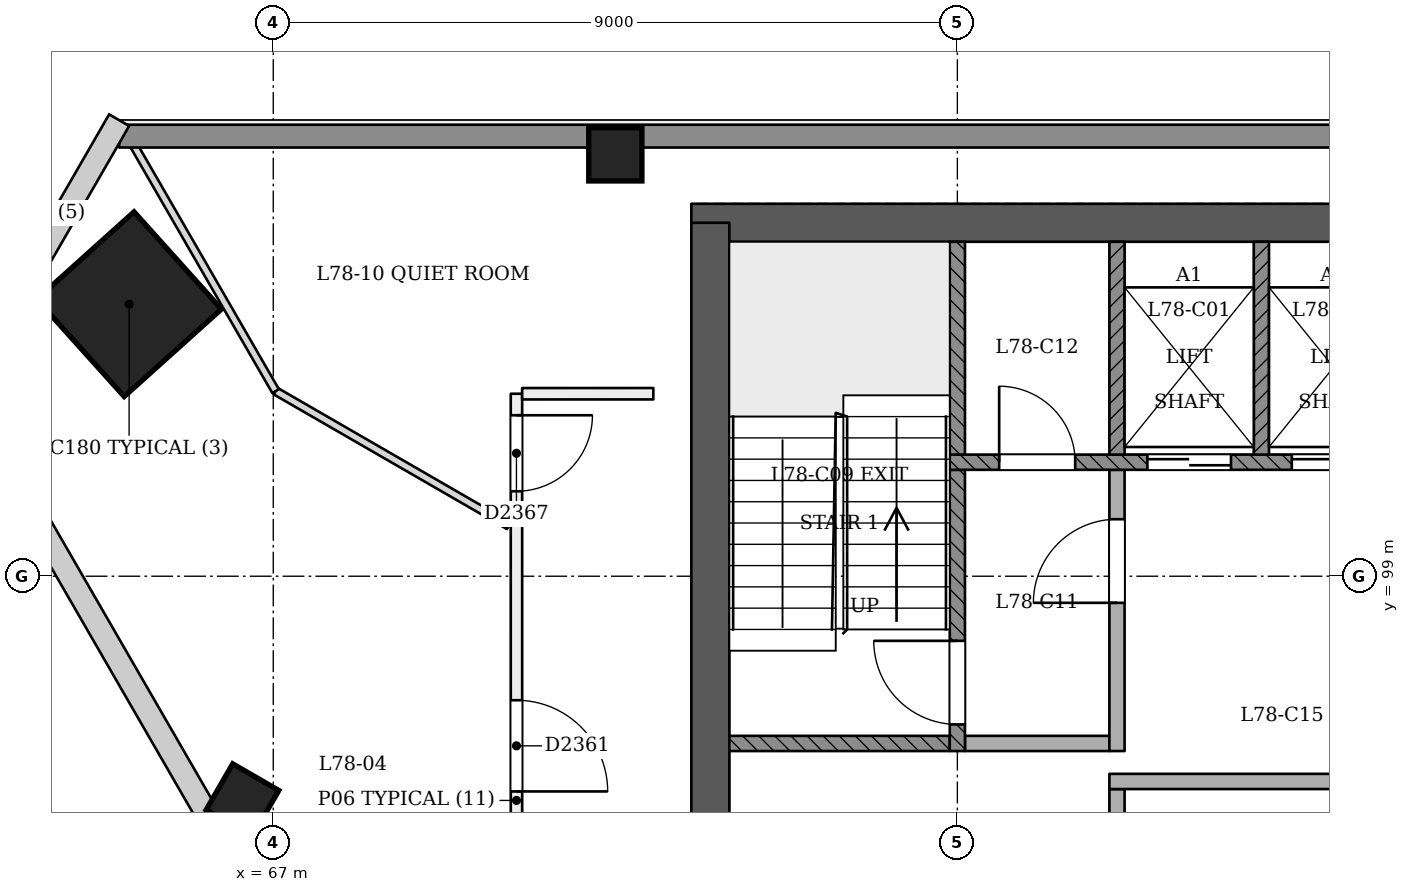
"""IFC4 building model, lengths in metres.
Left out: names, types, materials, properties, quantities, classifications, styles, units other than length and angle.
Written with IfcOpenShell. Run it as: python <this file> out.ifc"""

import sys

from ifc_helpers import new_model, si_unit, direction, frame, frame_2d, origin, origin_2d, place, context, subcontext, project, spatial, rectangle, extrude, element, fill, save


model = new_model("IFC4")
c1 = context("Model", 3, precision=1e-05, world=origin(), true_north=direction((0.0, 1.0)))
c2 = subcontext(c1, "Body", "Model", "MODEL_VIEW")
j1 = project(units=[si_unit("LENGTHUNIT", "METRE"), si_unit("PLANEANGLEUNIT", "RADIAN")], contexts=[c1])
p1 = place(None, origin())
s1 = spatial("IfcSite", under=j1, at=p1, CompositionType="ELEMENT")
p2 = place(p1, origin())
s2 = spatial("IfcBuilding", under=s1, at=p2, CompositionType="ELEMENT")
p3 = place(p2, frame((0.0, 0.0, 302.2)))
s3 = spatial("IfcBuildingStorey", under=s2, at=p3, CompositionType="ELEMENT", Elevation=302.2)
p4 = place(p3, frame((97.25, 103.65, 0.0), z_axis=(0.0, 0.0, 1.0), x_axis=(-1.0, 0.0, 0.0)))
e1 = element("IfcWall", 1, at=p4, inside=s3, PredefinedType="SHEAR", context=c2, shape_type="SweptSolid", body=[
    extrude(rectangle(XDim=24.75, YDim=0.5, at=frame_2d((12.375, 0.0))), origin(), (0.0, 0.0, 1.0), 3.6),
])
p5 = place(p3, frame((72.75, 103.65, 0.0), z_axis=(0.0, 0.0, 1.0), x_axis=(0.0, -1.0, 0.0)))
e2 = element("IfcWall", 2, at=p5, inside=s3, PredefinedType="SHEAR", context=c2, shape_type="SweptSolid", body=[
    extrude(rectangle(XDim=10.75, YDim=0.5, at=frame_2d((5.375, 0.0))), origin(), (0.0, 0.0, 1.0), 3.6),
])
p6 = place(p3, frame((65.069, 102.568, 0.0), z_axis=(0.028401796786, 0.009286506348, 0.999553449666), x_axis=(-0.866200496686, 0.499297251293, 0.019973842716)))
e3 = element("IfcColumn", 3, at=p6, inside=s3, PredefinedType="COLUMN", context=c2, shape_type="SweptSolid", body=[
    extrude(rectangle(XDim=1.72, YDim=1.72, at=origin_2d()), origin(), (0.0, 0.0, 1.0), 3.602),
])
p7 = place(p3, frame((71.5, 104.55, 0.0), z_axis=(0.0, 0.0, 1.0), x_axis=(1.0, 0.0, 0.0)))
e4 = element("IfcColumn", 4, at=p7, inside=s3, PredefinedType="COLUMN", context=c2, shape_type="SweptSolid", body=[
    extrude(rectangle(XDim=0.7, YDim=0.7, at=origin_2d()), origin(), (0.0, 0.0, 1.0), 3.6),
])
p8 = place(p3, frame((66.567, 96.007, -0.021), z_axis=(0.02222134892, 0.038480872521, 0.999012229206), x_axis=(-0.865642107509, -0.499182153693, 0.038482712231)))
e5 = element("IfcColumn", 5, at=p8, inside=s3, PredefinedType="COLUMN", context=c2, shape_type="SweptSolid", body=[
    extrude(rectangle(XDim=0.7, YDim=0.7, at=origin_2d()), origin(), (0.0, 0.0, 1.0), 3.604),
])
p9 = place(p3, frame((70.199, 101.401, 0.0), z_axis=(0.0, 0.0, 1.0), x_axis=(6.844627e-05, -0.999999997658, 0.0)))
e6 = element("IfcWall", 6, at=p9, inside=s3, PredefinedType="PARTITIONING", context=c2, shape_type="SweptSolid", body=[
    extrude(rectangle(XDim=10.701, YDim=0.15, at=frame_2d((5.35, 0.0))), origin(), (0.0, 0.0, 1.0), 3.2),
])
p10 = place(p9, frame((4.032, 0.0, 0.0)))
e7 = element("IfcOpeningElement", 7, at=p10, cuts=e6, PredefinedType="OPENING", context=c2, shape_type="SweptSolid", body=[
    extrude(rectangle(XDim=1.2, YDim=2.1, at=frame_2d((0.6, 1.05))), frame((0.0, 0.085, 0.0), z_axis=(0.0, -1.0, 0.0), x_axis=(1.0, 0.0, 0.0)), (0.0, 0.0, 1.0), 0.171),
])
p11 = place(p9, frame((0.283, 0.0, 0.0)))
e8 = element("IfcOpeningElement", 8, at=p11, cuts=e6, PredefinedType="OPENING", context=c2, shape_type="SweptSolid", body=[
    extrude(rectangle(XDim=1.0, YDim=2.1, at=frame_2d((0.5, 1.05))), frame((0.0, 0.085, 0.0), z_axis=(0.0, -1.0, 0.0), x_axis=(1.0, 0.0, 0.0)), (0.0, 0.0, 1.0), 0.171),
])
p12 = place(p3, frame((72.0, 101.401, 0.0), z_axis=(0.0, 0.0, 1.0), x_axis=(-0.999999989991, -0.000141482738, 0.0)))
e9 = element("IfcWall", 9, at=p12, inside=s3, PredefinedType="PARTITIONING", context=c2, shape_type="SweptSolid", body=[
    extrude(rectangle(XDim=1.726, YDim=0.15, at=frame_2d((0.863, 0.0))), origin(), (0.0, 0.0, 1.0), 3.2),
])
p13 = place(p3, frame((70.099, 99.664, 0.0), z_axis=(0.0, 0.0, 1.0), x_axis=(-0.866034141321, 0.499984865837, 0.0)))
e10 = element("IfcWall", 10, at=p13, inside=s3, PredefinedType="PARTITIONING", context=c2, shape_type="SweptSolid", body=[
    extrude(rectangle(XDim=3.543, YDim=0.1, at=frame_2d((1.772, 0.0))), origin(), (0.0, 0.0, 1.0), 3.2),
])
p14 = place(p3, frame((67.031, 101.435, 0.0), z_axis=(0.0, 0.0, 1.0), x_axis=(-0.499991868013, 0.866030098739, 0.0)))
e11 = element("IfcWall", 11, at=p14, inside=s3, PredefinedType="PARTITIONING", context=c2, shape_type="SweptSolid", body=[
    extrude(rectangle(XDim=4.0, YDim=0.1, at=frame_2d((2.0, 0.0))), origin(), (0.0, 0.0, 1.0), 2.7),
])
p15 = place(p3, frame((64.972, 104.79, 0.0), z_axis=(0.0, 0.0, 1.0), x_axis=(1.0, 0.0, 0.0)))
e12 = element("IfcWall", 12, at=p15, inside=s3, PredefinedType="SOLIDWALL", context=c2, shape_type="SweptSolid", body=[
    extrude(rectangle(XDim=40.055, YDim=0.3, at=frame_2d((20.028, 0.0))), origin(), (0.0, 0.0, 1.0), 2.7),
])
p16 = place(p3, frame((78.1, 93.4, 0.0), z_axis=(0.0, 0.0, 1.0), x_axis=(0.0, 1.0, 0.0)))
e13 = element("IfcWall", 13, at=p16, inside=s3, PredefinedType="PARTITIONING", context=c2, shape_type="SweptSolid", body=[
    extrude(rectangle(XDim=2.8, YDim=0.2, at=frame_2d((1.4, 0.0))), origin(), (0.0, 0.0, 1.0), 3.2),
])
p17 = place(p3, frame((78.0, 96.3, 0.0), z_axis=(0.0, 0.0, 1.0), x_axis=(1.0, 0.0, 0.0)))
e14 = element("IfcWall", 14, at=p17, inside=s3, PredefinedType="PARTITIONING", context=c2, shape_type="SweptSolid", body=[
    extrude(rectangle(XDim=7.8, YDim=0.2, at=frame_2d((3.9, 0.0))), origin(), (0.0, 0.0, 1.0), 3.2),
])
p18 = place(p17, frame((3.4, 0.0, 0.0)))
e15 = element("IfcOpeningElement", 15, at=p18, cuts=e14, PredefinedType="OPENING", context=c2, shape_type="SweptSolid", body=[
    extrude(rectangle(XDim=1.0, YDim=2.1, at=frame_2d((0.5, 1.05))), frame((0.0, 0.11, 0.0), z_axis=(0.0, -1.0, 0.0), x_axis=(1.0, 0.0, 0.0)), (0.0, 0.0, 1.0), 0.221),
])
p19 = place(p3, frame((73.0, 96.8, 0.0), z_axis=(0.0, 0.0, 1.0), x_axis=(1.0, 0.0, 0.0)))
e16 = element("IfcWall", 16, at=p19, inside=s3, PredefinedType="SOLIDWALL", context=c2, shape_type="SweptSolid", body=[
    extrude(rectangle(XDim=2.9, YDim=0.2, at=frame_2d((1.45, 0.0))), origin(), (0.0, 0.0, 1.0), 3.2),
])
p20 = place(p3, frame((76.0, 96.7, 0.0), z_axis=(0.0, 0.0, 1.0), x_axis=(0.0, 1.0, 0.0)))
e17 = element("IfcWall", 17, at=p20, inside=s3, PredefinedType="SOLIDWALL", context=c2, shape_type="SweptSolid", body=[
    extrude(rectangle(XDim=3.7, YDim=0.2, at=frame_2d((1.85, 0.0))), origin(), (0.0, 0.0, 1.0), 3.2),
])
p21 = place(p20, frame((0.35, 0.0, 0.0)))
e18 = element("IfcOpeningElement", 18, at=p21, cuts=e17, PredefinedType="OPENING", context=c2, shape_type="SweptSolid", body=[
    extrude(rectangle(XDim=1.1, YDim=2.1, at=frame_2d((0.55, 1.05))), frame((0.0, 0.11, 0.0), z_axis=(0.0, -1.0, 0.0), x_axis=(1.0, 0.0, 0.0)), (0.0, 0.0, 1.0), 0.221),
])
p22 = place(p3, frame((76.1, 96.8, 0.0), z_axis=(0.0, 0.0, 1.0), x_axis=(1.0, 0.0, 0.0)))
e19 = element("IfcWall", 19, at=p22, inside=s3, PredefinedType="PARTITIONING", context=c2, shape_type="SweptSolid", body=[
    extrude(rectangle(XDim=1.9, YDim=0.2, at=frame_2d((0.95, 0.0))), origin(), (0.0, 0.0, 1.0), 3.2),
])
p23 = place(p3, frame((78.1, 96.7, 0.0), z_axis=(0.0, 0.0, 1.0), x_axis=(0.0, 1.0, 0.0)))
e20 = element("IfcWall", 20, at=p23, inside=s3, PredefinedType="PARTITIONING", context=c2, shape_type="SweptSolid", body=[
    extrude(rectangle(XDim=3.7, YDim=0.2, at=frame_2d((1.85, 0.0))), origin(), (0.0, 0.0, 1.0), 3.2),
])
p24 = place(p23, frame((1.95, 0.0, 0.0)))
e21 = element("IfcOpeningElement", 21, at=p24, cuts=e20, PredefinedType="OPENING", context=c2, shape_type="SweptSolid", body=[
    extrude(rectangle(XDim=1.1, YDim=2.1, at=frame_2d((0.55, 1.05))), frame((0.0, 0.11, 0.0), z_axis=(0.0, -1.0, 0.0), x_axis=(1.0, 0.0, 0.0)), (0.0, 0.0, 1.0), 0.221),
])
p25 = place(p3, frame((75.9, 100.5, 0.0), z_axis=(0.0, 0.0, 1.0), x_axis=(1.0, 0.0, 0.0)))
e22 = element("IfcWall", 22, at=p25, inside=s3, PredefinedType="SOLIDWALL", context=c2, shape_type="SweptSolid", body=[
    extrude(rectangle(XDim=18.2, YDim=0.2, at=frame_2d((9.1, 0.0))), origin(), (0.0, 0.0, 1.0), 3.2),
])
p26 = place(p25, frame((2.6, 0.0, 0.0)))
e23 = element("IfcOpeningElement", 23, at=p26, cuts=e22, PredefinedType="OPENING", context=c2, shape_type="SweptSolid", body=[
    extrude(rectangle(XDim=1.1, YDim=2.1, at=frame_2d((0.55, 1.05))), frame((0.0, 0.11, 0.0), z_axis=(0.0, -1.0, 0.0), x_axis=(1.0, 0.0, 0.0)), (0.0, 0.0, 1.0), 0.221),
])
p27 = place(p25, frame((4.5, 0.0, 0.0)))
e24 = element("IfcOpeningElement", 24, at=p27, cuts=e22, PredefinedType="OPENING", context=c2, shape_type="SweptSolid", body=[
    extrude(rectangle(XDim=1.1, YDim=2.1, at=frame_2d((0.55, 1.05))), frame((0.0, 0.11, 0.0), z_axis=(0.0, -1.0, 0.0), x_axis=(1.0, 0.0, 0.0)), (0.0, 0.0, 1.0), 0.221),
])
p28 = place(p25, frame((6.4, 0.0, 0.0)))
e25 = element("IfcOpeningElement", 25, at=p28, cuts=e22, PredefinedType="OPENING", context=c2, shape_type="SweptSolid", body=[
    extrude(rectangle(XDim=1.1, YDim=2.1, at=frame_2d((0.55, 1.05))), frame((0.0, 0.11, 0.0), z_axis=(0.0, -1.0, 0.0), x_axis=(1.0, 0.0, 0.0)), (0.0, 0.0, 1.0), 0.221),
])
p29 = place(p25, frame((8.3, 0.0, 0.0)))
e26 = element("IfcOpeningElement", 26, at=p29, cuts=e22, PredefinedType="OPENING", context=c2, shape_type="SweptSolid", body=[
    extrude(rectangle(XDim=1.1, YDim=2.1, at=frame_2d((0.55, 1.05))), frame((0.0, 0.11, 0.0), z_axis=(0.0, -1.0, 0.0), x_axis=(1.0, 0.0, 0.0)), (0.0, 0.0, 1.0), 0.221),
])
p30 = place(p25, frame((10.2, 0.0, 0.0)))
e27 = element("IfcOpeningElement", 27, at=p30, cuts=e22, PredefinedType="OPENING", context=c2, shape_type="SweptSolid", body=[
    extrude(rectangle(XDim=1.1, YDim=2.1, at=frame_2d((0.55, 1.05))), frame((0.0, 0.11, 0.0), z_axis=(0.0, -1.0, 0.0), x_axis=(1.0, 0.0, 0.0)), (0.0, 0.0, 1.0), 0.221),
])
p31 = place(p25, frame((12.1, 0.0, 0.0)))
e28 = element("IfcOpeningElement", 28, at=p31, cuts=e22, PredefinedType="OPENING", context=c2, shape_type="SweptSolid", body=[
    extrude(rectangle(XDim=1.1, YDim=2.1, at=frame_2d((0.55, 1.05))), frame((0.0, 0.11, 0.0), z_axis=(0.0, -1.0, 0.0), x_axis=(1.0, 0.0, 0.0)), (0.0, 0.0, 1.0), 0.221),
])
p32 = place(p25, frame((14.0, 0.0, 0.0)))
e29 = element("IfcOpeningElement", 29, at=p32, cuts=e22, PredefinedType="OPENING", context=c2, shape_type="SweptSolid", body=[
    extrude(rectangle(XDim=1.1, YDim=2.1, at=frame_2d((0.55, 1.05))), frame((0.0, 0.11, 0.0), z_axis=(0.0, -1.0, 0.0), x_axis=(1.0, 0.0, 0.0)), (0.0, 0.0, 1.0), 0.221),
])
p33 = place(p25, frame((0.65, 0.0, 0.0)))
e30 = element("IfcOpeningElement", 30, at=p33, cuts=e22, PredefinedType="OPENING", context=c2, shape_type="SweptSolid", body=[
    extrude(rectangle(XDim=1.0, YDim=2.1, at=frame_2d((0.5, 1.05))), frame((0.0, 0.11, 0.0), z_axis=(0.0, -1.0, 0.0), x_axis=(1.0, 0.0, 0.0)), (0.0, 0.0, 1.0), 0.221),
])
p34 = place(p25, frame((16.3, 0.0, 0.0)))
e31 = element("IfcOpeningElement", 31, at=p34, cuts=e22, PredefinedType="OPENING", context=c2, shape_type="SweptSolid", body=[
    extrude(rectangle(XDim=1.0, YDim=2.1, at=frame_2d((0.5, 1.05))), frame((0.0, 0.11, 0.0), z_axis=(0.0, -1.0, 0.0), x_axis=(1.0, 0.0, 0.0)), (0.0, 0.0, 1.0), 0.221),
])
for number, where, z_axis, x_axis in (
    (32, (76.0, 100.6, 0.0), (0.0, 0.0, 1.0), (0.0, 1.0, 0.0)),
    (33, (78.1, 100.6, 0.0), (0.0, 0.0, 1.0), (0.0, 1.0, 0.0)),
    (34, (80.0, 100.6, 0.0), (0.0, 0.0, 1.0), (0.0, 1.0, 0.0)),
):
    element("IfcWall", number, at=place(p3, frame(where, z_axis=z_axis, x_axis=x_axis)), inside=s3, PredefinedType="SOLIDWALL", context=c2, shape_type="SweptSolid", body=[
        extrude(rectangle(XDim=2.8, YDim=0.2, at=frame_2d((1.4, 0.0))), origin(), (0.0, 0.0, 1.0), 3.2),
    ])
p35 = place(p10, origin())
e35 = element("IfcDoor", 35, at=p35, inside=s3, OperationType="SINGLE_SWING_RIGHT", PredefinedType="NOTDEFINED", context=c2, shape_type="SweptSolid", body=[
    extrude(rectangle(XDim=1.2, YDim=2.1, at=frame_2d((0.6, 1.05))), frame((0.0, 0.025, 0.0), z_axis=(0.0, -1.0, 0.0), x_axis=(1.0, 0.0, 0.0)), (0.0, 0.0, 1.0), 0.05),
])
fill(e7, e35)
p36 = place(p11, origin())
e36 = element("IfcDoor", 36, at=p36, inside=s3, OperationType="SINGLE_SWING_LEFT", PredefinedType="NOTDEFINED", context=c2, shape_type="SweptSolid", body=[
    extrude(rectangle(XDim=1.0, YDim=2.1, at=frame_2d((0.5, 1.05))), frame((0.0, 0.025, 0.0), z_axis=(0.0, -1.0, 0.0), x_axis=(1.0, 0.0, 0.0)), (0.0, 0.0, 1.0), 0.05),
])
fill(e8, e36)
p37 = place(p26, origin())
e37 = element("IfcDoor", 37, at=p37, inside=s3, OperationType="SLIDING_TO_RIGHT", PredefinedType="NOTDEFINED", context=c2, shape_type="SweptSolid", body=[
    extrude(rectangle(XDim=1.1, YDim=2.1, at=frame_2d((0.55, 1.05))), frame((0.0, 0.025, 0.0), z_axis=(0.0, -1.0, 0.0), x_axis=(1.0, 0.0, 0.0)), (0.0, 0.0, 1.0), 0.05),
])
fill(e23, e37)
p38 = place(p27, origin())
e38 = element("IfcDoor", 38, at=p38, inside=s3, OperationType="SLIDING_TO_LEFT", PredefinedType="NOTDEFINED", context=c2, shape_type="SweptSolid", body=[
    extrude(rectangle(XDim=1.1, YDim=2.1, at=frame_2d((0.55, 1.05))), frame((0.0, 0.025, 0.0), z_axis=(0.0, -1.0, 0.0), x_axis=(1.0, 0.0, 0.0)), (0.0, 0.0, 1.0), 0.05),
])
fill(e24, e38)
p39 = place(p21, origin())
e39 = element("IfcDoor", 39, at=p39, inside=s3, OperationType="SINGLE_SWING_RIGHT", PredefinedType="NOTDEFINED", context=c2, shape_type="SweptSolid", body=[
    extrude(rectangle(XDim=1.1, YDim=2.1, at=frame_2d((0.55, 1.05))), frame((0.0, 0.025, 0.0), z_axis=(0.0, -1.0, 0.0), x_axis=(1.0, 0.0, 0.0)), (0.0, 0.0, 1.0), 0.05),
])
fill(e18, e39)
p40 = place(p24, origin())
e40 = element("IfcDoor", 40, at=p40, inside=s3, OperationType="SINGLE_SWING_LEFT", PredefinedType="NOTDEFINED", context=c2, shape_type="SweptSolid", body=[
    extrude(rectangle(XDim=1.1, YDim=2.1, at=frame_2d((0.55, 1.05))), frame((0.0, 0.025, 0.0), z_axis=(0.0, -1.0, 0.0), x_axis=(1.0, 0.0, 0.0)), (0.0, 0.0, 1.0), 0.05),
])
fill(e21, e40)
p41 = place(p33, origin())
e41 = element("IfcDoor", 41, at=p41, inside=s3, OperationType="SINGLE_SWING_LEFT", PredefinedType="NOTDEFINED", context=c2, shape_type="SweptSolid", body=[
    extrude(rectangle(XDim=1.0, YDim=2.1, at=frame_2d((0.5, 1.05))), frame((0.0, 0.025, 0.0), z_axis=(0.0, -1.0, 0.0), x_axis=(1.0, 0.0, 0.0)), (0.0, 0.0, 1.0), 0.05),
])
fill(e30, e41)
save(model, sys.argv[1])
